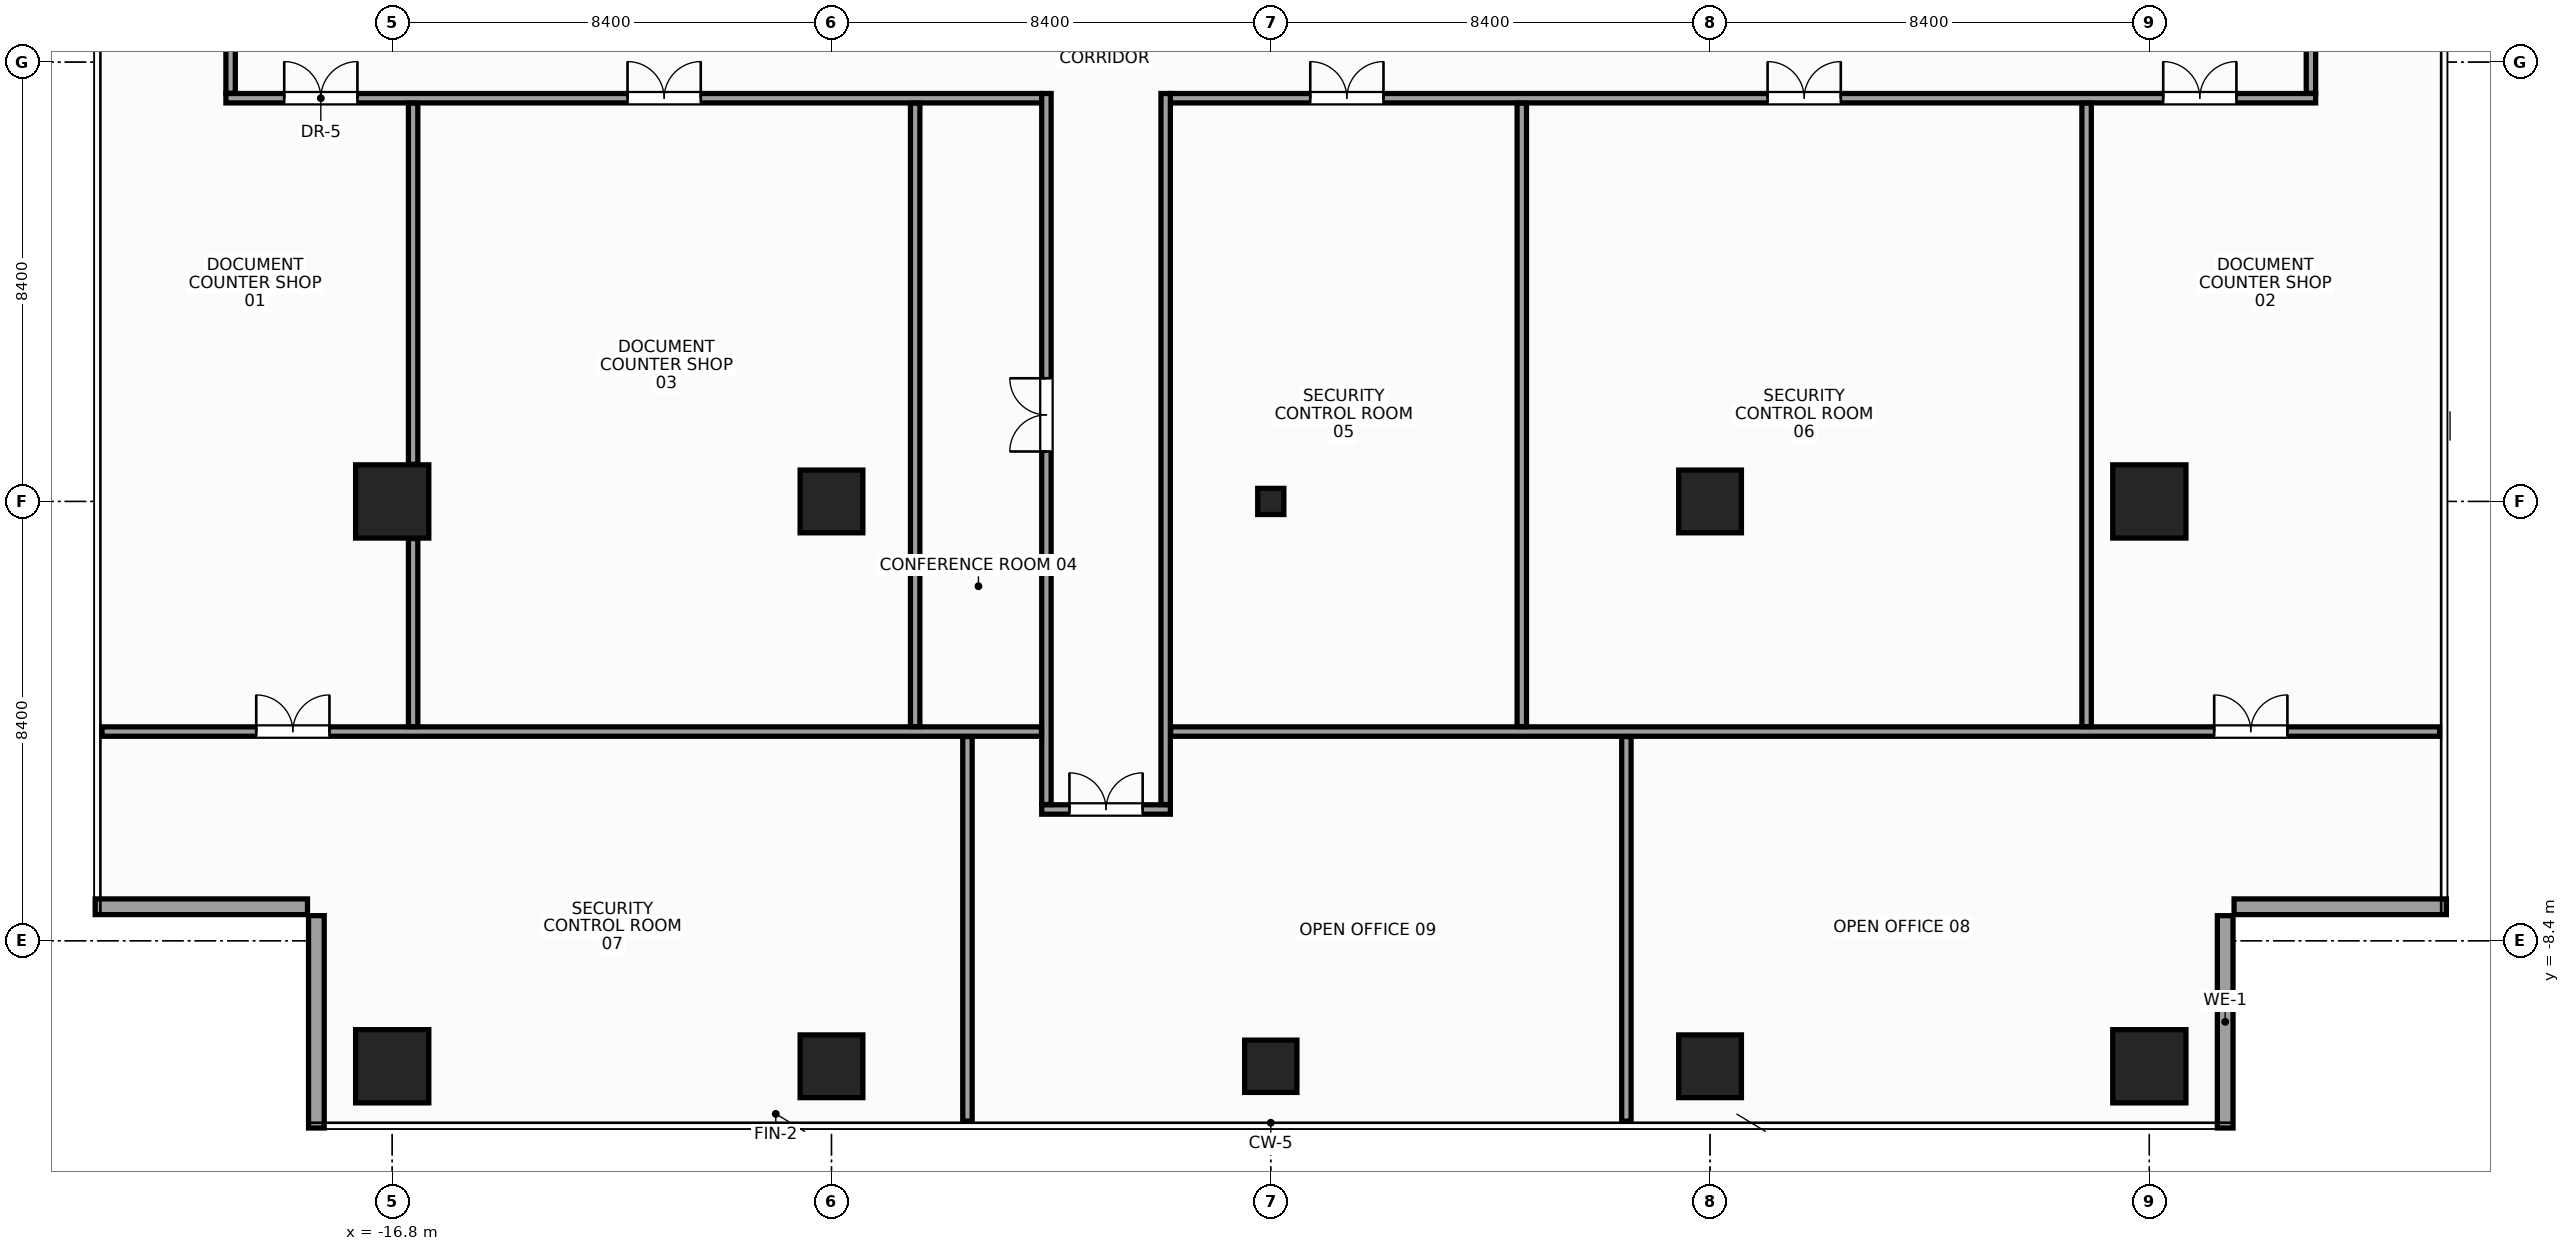
"""IFC4 building model, lengths in metres.
Left out: names, types, materials, properties, quantities, classifications, styles, units other than length and angle.
Written with IfcOpenShell. Run it as: python <this file> out.ifc"""

import sys

from ifc_helpers import new_model, si_unit, direction, frame, frame_2d, origin, origin_with_axes, origin_2d, place, context, subcontext, project, spatial, rectangle, hollow_rectangle, extrude, source, transform, mapped, element, fill, save


model = new_model("IFC4")
c1 = context("Model", 3, precision=1e-05, world=origin(), true_north=direction((0.0, 1.0)))
c2 = subcontext(c1, "Body", "Model", "MODEL_VIEW")
j1 = project(units=[si_unit("LENGTHUNIT", "METRE"), si_unit("PLANEANGLEUNIT", "RADIAN")], contexts=[c1])
p1 = place(None, origin())
s1 = spatial("IfcSite", under=j1, at=p1, CompositionType="ELEMENT")
p2 = place(p1, origin())
s2 = spatial("IfcBuilding", under=s1, at=p2, CompositionType="ELEMENT")
p3 = place(p2, frame((0.0, 0.0, 264.8)))
s3 = spatial("IfcBuildingStorey", under=s2, at=p3, CompositionType="ELEMENT", Elevation=264.8)
m1 = source(origin(), c2, "Body", "SweptSolid", [
    extrude(rectangle(XDim=1.4, YDim=1.4, at=origin_2d()), origin(), (0.0, 0.0, 1.0), 3.6),
])
for number, where, z_axis, x_axis in (
    (1, (-16.8, -10.8, 0.0), (0.0, 0.0, 1.0), (1.0, 0.0, 0.0)),
    (2, (-16.8, 0.0, 0.0), (0.0, 0.0, 1.0), (1.0, 0.0, 0.0)),
    (3, (16.8, -10.8, 0.0), (0.0, 0.0, 1.0), (1.0, 0.0, 0.0)),
    (4, (16.8, 0.0, 0.0), (0.0, 0.0, 1.0), (1.0, 0.0, 0.0)),
):
    element("IfcColumn", number, at=place(p3, frame(where, z_axis=z_axis, x_axis=x_axis)), inside=s3, PredefinedType="COLUMN", context=c2, shape_type="MappedRepresentation", body=[
        mapped(m1, transform((0.0, 0.0, 0.0), x_axis=(1.0, 0.0, 0.0), y_axis=(0.0, 1.0, 0.0), z_axis=(0.0, 0.0, 1.0), scale=1.0)),
    ])
m2 = source(origin(), c2, "Body", "SweptSolid", [
    extrude(rectangle(XDim=1.2, YDim=1.2, at=origin_2d()), origin(), (0.0, 0.0, 1.0), 3.6),
])
for number, where, z_axis, x_axis in (
    (5, (-8.4, 0.0, 0.0), (0.0, 0.0, 1.0), (1.0, 0.0, 0.0)),
    (6, (-8.4, -10.8, 0.0), (0.0, 0.0, 1.0), (1.0, 0.0, 0.0)),
    (7, (8.4, 0.0, 0.0), (0.0, 0.0, 1.0), (1.0, 0.0, 0.0)),
    (8, (8.4, -10.8, 0.0), (0.0, 0.0, 1.0), (1.0, 0.0, 0.0)),
):
    element("IfcColumn", number, at=place(p3, frame(where, z_axis=z_axis, x_axis=x_axis)), inside=s3, PredefinedType="COLUMN", context=c2, shape_type="MappedRepresentation", body=[
        mapped(m2, transform((0.0, 0.0, 0.0), x_axis=(1.0, 0.0, 0.0), y_axis=(0.0, 1.0, 0.0), z_axis=(0.0, 0.0, 1.0), scale=1.0)),
    ])
m3 = source(origin(), c2, "Body", "SweptSolid", [
    extrude(rectangle(XDim=1.0, YDim=1.0, at=origin_2d()), origin(), (0.0, 0.0, 1.0), 3.6),
])
p4 = place(p3, frame((0.0, -10.8, 0.0), z_axis=(0.0, 0.0, 1.0), x_axis=(1.0, 0.0, 0.0)))
e9 = element("IfcColumn", 9, at=p4, inside=s3, PredefinedType="COLUMN", context=c2, shape_type="MappedRepresentation", body=[
    mapped(m3, transform((0.0, 0.0, 0.0), x_axis=(1.0, 0.0, 0.0), y_axis=(0.0, 1.0, 0.0), z_axis=(0.0, 0.0, 1.0), scale=1.0)),
])
m4 = source(origin(), c2, "Body", "SweptSolid", [
    extrude(hollow_rectangle(XDim=0.5, YDim=0.5, WallThickness=0.025, at=origin_2d()), origin(), (0.0, 0.0, 1.0), 3.6),
])
p5 = place(p3, origin_with_axes())
e10 = element("IfcColumn", 10, at=p5, inside=s3, PredefinedType="COLUMN", context=c2, shape_type="MappedRepresentation", body=[
    mapped(m4, transform((0.0, 0.0, 0.0), x_axis=(1.0, 0.0, 0.0), y_axis=(0.0, 1.0, 0.0), z_axis=(0.0, 0.0, 1.0), scale=1.0)),
])
m5 = source(origin(), c2, "Body", "SweptSolid", [
    extrude(rectangle(XDim=4.06, YDim=0.3, at=frame_2d((2.03, 0.0))), origin(), (0.0, 0.0, 1.0), 2.75),
])
for number, where, z_axis, x_axis in (
    (11, (18.25, -11.98, 0.0), (0.0, 0.0, 1.0), (0.0, 1.0, 0.0)),
    (12, (18.42, -7.75, 0.0), (0.0, 0.0, 1.0), (1.0, 0.0, 0.0)),
    (13, (-22.48, -7.75, 0.0), (0.0, 0.0, 1.0), (1.0, 0.0, 0.0)),
    (14, (-18.25, -7.92, 0.0), (0.0, 0.0, 1.0), (0.0, -1.0, 0.0)),
):
    element("IfcWall", number, at=place(p3, frame(where, z_axis=z_axis, x_axis=x_axis)), inside=s3, PredefinedType="STANDARD", context=c2, shape_type="MappedRepresentation", body=[
        mapped(m5, transform((0.0, 0.0, 0.0), x_axis=(1.0, 0.0, 0.0), y_axis=(0.0, 1.0, 0.0), z_axis=(0.0, 0.0, 1.0), scale=1.0)),
    ])
m6 = source(origin(), c2, "Body", "SweptSolid", [
    extrude(rectangle(XDim=15.6, YDim=0.18, at=frame_2d((7.8, 0.0))), origin(), (0.0, 0.0, 1.0), 2.755),
])
p6 = place(p3, frame((-19.98, 7.71, 0.0), z_axis=(0.0, 0.0, 1.0), x_axis=(1.0, 0.0, 0.0)))
e15 = element("IfcWall", 15, at=p6, inside=s3, PredefinedType="PARTITIONING", context=c2, shape_type="MappedRepresentation", body=[
    mapped(m6, transform((0.0, 0.0, 0.0), x_axis=(1.0, 0.0, 0.0), y_axis=(0.0, 1.0, 0.0), z_axis=(0.0, 0.0, 1.0), scale=1.0)),
])
p7 = place(p6, frame((1.115, 0.0, 0.0)))
e16 = element("IfcOpeningElement", 16, at=p7, cuts=e15, PredefinedType="OPENING", context=c2, shape_type="SweptSolid", body=[
    extrude(rectangle(XDim=1.4, YDim=2.2, at=frame_2d((0.7, 1.1))), frame((0.0, 0.102, 0.0), z_axis=(0.0, -1.0, 0.0), x_axis=(1.0, 0.0, 0.0)), (0.0, 0.0, 1.0), 0.204),
])
p8 = place(p6, frame((7.68, 0.0, 0.0)))
e17 = element("IfcOpeningElement", 17, at=p8, cuts=e15, PredefinedType="OPENING", context=c2, shape_type="SweptSolid", body=[
    extrude(rectangle(XDim=1.4, YDim=2.2, at=frame_2d((0.7, 1.1))), frame((0.0, 0.102, 0.0), z_axis=(0.0, -1.0, 0.0), x_axis=(1.0, 0.0, 0.0)), (0.0, 0.0, 1.0), 0.204),
])
m7 = source(origin(), c2, "Body", "SweptSolid", [
    extrude(rectangle(XDim=21.9, YDim=0.18, at=frame_2d((10.95, 0.0))), origin(), (0.0, 0.0, 1.0), 2.755),
])
p9 = place(p3, frame((-1.92, 7.71, 0.0), z_axis=(0.0, 0.0, 1.0), x_axis=(1.0, 0.0, 0.0)))
e18 = element("IfcWall", 18, at=p9, inside=s3, PredefinedType="PARTITIONING", context=c2, shape_type="MappedRepresentation", body=[
    mapped(m7, transform((0.0, 0.0, 0.0), x_axis=(1.0, 0.0, 0.0), y_axis=(0.0, 1.0, 0.0), z_axis=(0.0, 0.0, 1.0), scale=1.0)),
])
p10 = place(p9, frame((18.985, 0.0, 0.0)))
e19 = element("IfcOpeningElement", 19, at=p10, cuts=e18, PredefinedType="OPENING", context=c2, shape_type="SweptSolid", body=[
    extrude(rectangle(XDim=1.4, YDim=2.2, at=frame_2d((0.7, 1.1))), frame((0.0, 0.102, 0.0), z_axis=(0.0, -1.0, 0.0), x_axis=(1.0, 0.0, 0.0)), (0.0, 0.0, 1.0), 0.204),
])
p11 = place(p9, frame((2.675, 0.0, 0.0)))
e20 = element("IfcOpeningElement", 20, at=p11, cuts=e18, PredefinedType="OPENING", context=c2, shape_type="SweptSolid", body=[
    extrude(rectangle(XDim=1.4, YDim=2.2, at=frame_2d((0.7, 1.1))), frame((0.0, 0.102, 0.0), z_axis=(0.0, -1.0, 0.0), x_axis=(1.0, 0.0, 0.0)), (0.0, 0.0, 1.0), 0.204),
])
p12 = place(p9, frame((11.42, 0.0, 0.0)))
e21 = element("IfcOpeningElement", 21, at=p12, cuts=e18, PredefinedType="OPENING", context=c2, shape_type="SweptSolid", body=[
    extrude(rectangle(XDim=1.4, YDim=2.2, at=frame_2d((0.7, 1.1))), frame((0.0, 0.102, 0.0), z_axis=(0.0, -1.0, 0.0), x_axis=(1.0, 0.0, 0.0)), (0.0, 0.0, 1.0), 0.204),
])
m8 = source(origin(), c2, "Body", "SweptSolid", [
    extrude(rectangle(XDim=2.46, YDim=0.18, at=frame_2d((1.23, 0.0))), origin(), (0.0, 0.0, 1.0), 3.37),
])
p13 = place(p3, frame((-4.38, -5.89, 0.0), z_axis=(0.0, 0.0, 1.0), x_axis=(1.0, 0.0, 0.0)))
e22 = element("IfcWall", 22, at=p13, inside=s3, PredefinedType="PARTITIONING", context=c2, shape_type="MappedRepresentation", body=[
    mapped(m8, transform((0.0, 0.0, 0.0), x_axis=(1.0, 0.0, 0.0), y_axis=(0.0, 1.0, 0.0), z_axis=(0.0, 0.0, 1.0), scale=1.0)),
])
p14 = place(p13, frame((0.53, 0.0, 0.0)))
e23 = element("IfcOpeningElement", 23, at=p14, cuts=e22, PredefinedType="OPENING", context=c2, shape_type="SweptSolid", body=[
    extrude(rectangle(XDim=1.4, YDim=2.2, at=frame_2d((0.7, 1.1))), frame((0.0, 0.102, 0.0), z_axis=(0.0, -1.0, 0.0), x_axis=(1.0, 0.0, 0.0)), (0.0, 0.0, 1.0), 0.204),
])
m9 = source(origin(), c2, "Body", "SweptSolid", [
    extrude(rectangle(XDim=2.1, YDim=0.18, at=frame_2d((1.05, 0.0))), origin(), (0.0, 0.0, 1.0), 3.37),
])
for number, where, z_axis, x_axis in (
    (24, (-19.89, 7.805, 0.0), (0.0, 0.0, 1.0), (0.0, 1.0, 0.0)),
    (25, (19.89, 7.805, 0.0), (0.0, 0.0, 1.0), (0.0, 1.0, 0.0)),
):
    element("IfcWall", number, at=place(p3, frame(where, z_axis=z_axis, x_axis=x_axis)), inside=s3, PredefinedType="PARTITIONING", context=c2, shape_type="MappedRepresentation", body=[
        mapped(m9, transform((0.0, 0.0, 0.0), x_axis=(1.0, 0.0, 0.0), y_axis=(0.0, 1.0, 0.0), z_axis=(0.0, 0.0, 1.0), scale=1.0)),
    ])
m10 = source(origin(), c2, "Body", "SweptSolid", [
    extrude(rectangle(XDim=13.595, YDim=0.18, at=frame_2d((6.797, 0.0))), origin(), (0.0, 0.0, 1.0), 2.655),
])
p15 = place(p3, frame((-4.29, -5.795, 0.0), z_axis=(0.0, 0.0, 1.0), x_axis=(0.0, 1.0, 0.0)))
e26 = element("IfcWall", 26, at=p15, inside=s3, PredefinedType="PARTITIONING", context=c2, shape_type="MappedRepresentation", body=[
    mapped(m10, transform((0.0, 0.0, 0.0), x_axis=(1.0, 0.0, 0.0), y_axis=(0.0, 1.0, 0.0), z_axis=(0.0, 0.0, 1.0), scale=1.0)),
])
p16 = place(p15, frame((6.75, 0.0, 0.0)))
e27 = element("IfcOpeningElement", 27, at=p16, cuts=e26, PredefinedType="OPENING", context=c2, shape_type="SweptSolid", body=[
    extrude(rectangle(XDim=1.4, YDim=2.2, at=frame_2d((0.7, 1.1))), frame((0.0, 0.102, 0.0), z_axis=(0.0, -1.0, 0.0), x_axis=(1.0, 0.0, 0.0)), (0.0, 0.0, 1.0), 0.204),
])
p17 = place(p3, frame((-2.01, -5.795, 0.0), z_axis=(0.0, 0.0, 1.0), x_axis=(0.0, 1.0, 0.0)))
e28 = element("IfcWall", 28, at=p17, inside=s3, PredefinedType="PARTITIONING", context=c2, shape_type="MappedRepresentation", body=[
    mapped(m10, transform((0.0, 0.0, 0.0), x_axis=(1.0, 0.0, 0.0), y_axis=(0.0, 1.0, 0.0), z_axis=(0.0, 0.0, 1.0), scale=1.0)),
])
m11 = source(origin(), c2, "Body", "SweptSolid", [
    extrude(rectangle(XDim=17.965, YDim=0.18, at=frame_2d((8.982, 0.0))), origin(), (0.0, 0.0, 1.0), 2.755),
])
p18 = place(p3, frame((-22.35, -4.4, 0.0), z_axis=(0.0, 0.0, 1.0), x_axis=(1.0, 0.0, 0.0)))
e29 = element("IfcWall", 29, at=p18, inside=s3, PredefinedType="PARTITIONING", context=c2, shape_type="MappedRepresentation", body=[
    mapped(m11, transform((0.0, 0.0, 0.0), x_axis=(1.0, 0.0, 0.0), y_axis=(0.0, 1.0, 0.0), z_axis=(0.0, 0.0, 1.0), scale=1.0)),
])
p19 = place(p18, frame((2.95, 0.0, 0.0)))
e30 = element("IfcOpeningElement", 30, at=p19, cuts=e29, PredefinedType="OPENING", context=c2, shape_type="SweptSolid", body=[
    extrude(rectangle(XDim=1.4, YDim=2.2, at=frame_2d((0.7, 1.1))), frame((0.0, 0.102, 0.0), z_axis=(0.0, -1.0, 0.0), x_axis=(1.0, 0.0, 0.0)), (0.0, 0.0, 1.0), 0.204),
])
m12 = source(origin(), c2, "Body", "SweptSolid", [
    extrude(rectangle(XDim=24.265, YDim=0.18, at=frame_2d((12.133, 0.0))), origin(), (0.0, 0.0, 1.0), 2.755),
])
p20 = place(p3, frame((-1.915, -4.4, 0.0), z_axis=(0.0, 0.0, 1.0), x_axis=(1.0, 0.0, 0.0)))
e31 = element("IfcWall", 31, at=p20, inside=s3, PredefinedType="PARTITIONING", context=c2, shape_type="MappedRepresentation", body=[
    mapped(m12, transform((0.0, 0.0, 0.0), x_axis=(1.0, 0.0, 0.0), y_axis=(0.0, 1.0, 0.0), z_axis=(0.0, 0.0, 1.0), scale=1.0)),
])
p21 = place(p20, frame((19.955, 0.0, 0.0)))
e32 = element("IfcOpeningElement", 32, at=p21, cuts=e31, PredefinedType="OPENING", context=c2, shape_type="SweptSolid", body=[
    extrude(rectangle(XDim=1.4, YDim=2.2, at=frame_2d((0.7, 1.1))), frame((0.0, 0.102, 0.0), z_axis=(0.0, -1.0, 0.0), x_axis=(1.0, 0.0, 0.0)), (0.0, 0.0, 1.0), 0.204),
])
m13 = source(origin(), c2, "Body", "SweptSolid", [
    extrude(rectangle(XDim=3.595, YDim=0.18, at=frame_2d((1.797, 0.0))), origin(), (0.0, 0.0, 1.0), 3.37),
])
p22 = place(p3, frame((-16.4, -4.305, 0.0), z_axis=(0.0, 0.0, 1.0), x_axis=(0.0, 1.0, 0.0)))
e33 = element("IfcWall", 33, at=p22, inside=s3, PredefinedType="PARTITIONING", context=c2, shape_type="MappedRepresentation", body=[
    mapped(m13, transform((0.0, 0.0, 0.0), x_axis=(1.0, 0.0, 0.0), y_axis=(0.0, 1.0, 0.0), z_axis=(0.0, 0.0, 1.0), scale=1.0)),
])
m14 = source(origin(), c2, "Body", "SweptSolid", [
    extrude(rectangle(XDim=6.905, YDim=0.18, at=frame_2d((3.453, 0.0))), origin(), (0.0, 0.0, 1.0), 2.655),
])
p23 = place(p3, frame((-16.4, 0.71, 0.0), z_axis=(0.0, 0.0, 1.0), x_axis=(0.0, 1.0, 0.0)))
e34 = element("IfcWall", 34, at=p23, inside=s3, PredefinedType="PARTITIONING", context=c2, shape_type="MappedRepresentation", body=[
    mapped(m14, transform((0.0, 0.0, 0.0), x_axis=(1.0, 0.0, 0.0), y_axis=(0.0, 1.0, 0.0), z_axis=(0.0, 0.0, 1.0), scale=1.0)),
])
m15 = source(origin(), c2, "Body", "SweptSolid", [
    extrude(rectangle(XDim=11.92, YDim=0.18, at=frame_2d((5.96, 0.0))), origin(), (0.0, 0.0, 1.0), 2.655),
])
for number, where, z_axis, x_axis in (
    (35, (-6.8, -4.305, 0.0), (0.0, 0.0, 1.0), (0.0, 1.0, 0.0)),
    (36, (4.8, -4.305, 0.0), (0.0, 0.0, 1.0), (0.0, 1.0, 0.0)),
    (37, (15.6, -4.305, 0.0), (0.0, 0.0, 1.0), (0.0, 1.0, 0.0)),
):
    element("IfcWall", number, at=place(p3, frame(where, z_axis=z_axis, x_axis=x_axis)), inside=s3, PredefinedType="PARTITIONING", context=c2, shape_type="MappedRepresentation", body=[
        mapped(m15, transform((0.0, 0.0, 0.0), x_axis=(1.0, 0.0, 0.0), y_axis=(0.0, 1.0, 0.0), z_axis=(0.0, 0.0, 1.0), scale=1.0)),
    ])
m16 = source(origin(), c2, "Body", "SweptSolid", [
    extrude(rectangle(XDim=7.355, YDim=0.18, at=frame_2d((3.677, 0.0))), origin(), (0.0, 0.0, 1.0), 2.905),
])
for number, where, z_axis, x_axis in (
    (38, (-5.8, -11.85, 0.0), (0.0, 0.0, 1.0), (0.0, 1.0, 0.0)),
    (39, (6.8, -11.85, 0.0), (0.0, 0.0, 1.0), (0.0, 1.0, 0.0)),
):
    element("IfcWall", number, at=place(p3, frame(where, z_axis=z_axis, x_axis=x_axis)), inside=s3, PredefinedType="PARTITIONING", context=c2, shape_type="MappedRepresentation", body=[
        mapped(m16, transform((0.0, 0.0, 0.0), x_axis=(1.0, 0.0, 0.0), y_axis=(0.0, 1.0, 0.0), z_axis=(0.0, 0.0, 1.0), scale=1.0)),
    ])
m17 = source(origin(), c2, "Body", "SweptSolid", [
    extrude(rectangle(XDim=1.4, YDim=2.2, at=frame_2d((0.7, 1.1))), frame((0.0, 0.025, 0.0), z_axis=(0.0, -1.0, 0.0), x_axis=(1.0, 0.0, 0.0)), (0.0, 0.0, 1.0), 0.05),
])
p24 = place(p7, origin())
e40 = element("IfcDoor", 40, at=p24, inside=s3, OperationType="DOUBLE_DOOR_SINGLE_SWING", PredefinedType="DOOR", context=c2, shape_type="MappedRepresentation", body=[
    mapped(m17, transform((0.0, 0.0, 0.0), x_axis=(1.0, 0.0, 0.0), y_axis=(0.0, 1.0, 0.0), z_axis=(0.0, 0.0, 1.0), scale=1.0)),
])
fill(e16, e40)
p25 = place(p10, origin())
e41 = element("IfcDoor", 41, at=p25, inside=s3, OperationType="DOUBLE_DOOR_SINGLE_SWING", PredefinedType="DOOR", context=c2, shape_type="MappedRepresentation", body=[
    mapped(m17, transform((0.0, 0.0, 0.0), x_axis=(1.0, 0.0, 0.0), y_axis=(0.0, 1.0, 0.0), z_axis=(0.0, 0.0, 1.0), scale=1.0)),
])
fill(e19, e41)
p26 = place(p8, origin())
e42 = element("IfcDoor", 42, at=p26, inside=s3, OperationType="DOUBLE_DOOR_SINGLE_SWING", PredefinedType="DOOR", context=c2, shape_type="MappedRepresentation", body=[
    mapped(m17, transform((0.0, 0.0, 0.0), x_axis=(1.0, 0.0, 0.0), y_axis=(0.0, 1.0, 0.0), z_axis=(0.0, 0.0, 1.0), scale=1.0)),
])
fill(e17, e42)
p27 = place(p16, origin())
e43 = element("IfcDoor", 43, at=p27, inside=s3, OperationType="DOUBLE_DOOR_SINGLE_SWING", PredefinedType="DOOR", context=c2, shape_type="MappedRepresentation", body=[
    mapped(m17, transform((0.0, 0.0, 0.0), x_axis=(1.0, 0.0, 0.0), y_axis=(0.0, 1.0, 0.0), z_axis=(0.0, 0.0, 1.0), scale=1.0)),
])
fill(e27, e43)
p28 = place(p11, origin())
e44 = element("IfcDoor", 44, at=p28, inside=s3, OperationType="DOUBLE_DOOR_SINGLE_SWING", PredefinedType="DOOR", context=c2, shape_type="MappedRepresentation", body=[
    mapped(m17, transform((0.0, 0.0, 0.0), x_axis=(1.0, 0.0, 0.0), y_axis=(0.0, 1.0, 0.0), z_axis=(0.0, 0.0, 1.0), scale=1.0)),
])
fill(e20, e44)
p29 = place(p12, origin())
e45 = element("IfcDoor", 45, at=p29, inside=s3, OperationType="DOUBLE_DOOR_SINGLE_SWING", PredefinedType="DOOR", context=c2, shape_type="MappedRepresentation", body=[
    mapped(m17, transform((0.0, 0.0, 0.0), x_axis=(1.0, 0.0, 0.0), y_axis=(0.0, 1.0, 0.0), z_axis=(0.0, 0.0, 1.0), scale=1.0)),
])
fill(e21, e45)
p30 = place(p14, origin())
e46 = element("IfcDoor", 46, at=p30, inside=s3, OperationType="DOUBLE_DOOR_SINGLE_SWING", PredefinedType="DOOR", context=c2, shape_type="MappedRepresentation", body=[
    mapped(m17, transform((0.0, 0.0, 0.0), x_axis=(1.0, 0.0, 0.0), y_axis=(0.0, 1.0, 0.0), z_axis=(0.0, 0.0, 1.0), scale=1.0)),
])
fill(e23, e46)
p31 = place(p19, origin())
e47 = element("IfcDoor", 47, at=p31, inside=s3, OperationType="DOUBLE_DOOR_SINGLE_SWING", PredefinedType="DOOR", context=c2, shape_type="MappedRepresentation", body=[
    mapped(m17, transform((0.0, 0.0, 0.0), x_axis=(1.0, 0.0, 0.0), y_axis=(0.0, 1.0, 0.0), z_axis=(0.0, 0.0, 1.0), scale=1.0)),
])
fill(e30, e47)
p32 = place(p21, origin())
e48 = element("IfcDoor", 48, at=p32, inside=s3, OperationType="DOUBLE_DOOR_SINGLE_SWING", PredefinedType="DOOR", context=c2, shape_type="MappedRepresentation", body=[
    mapped(m17, transform((0.0, 0.0, 0.0), x_axis=(1.0, 0.0, 0.0), y_axis=(0.0, 1.0, 0.0), z_axis=(0.0, 0.0, 1.0), scale=1.0)),
])
fill(e32, e48)
save(model, sys.argv[1])
